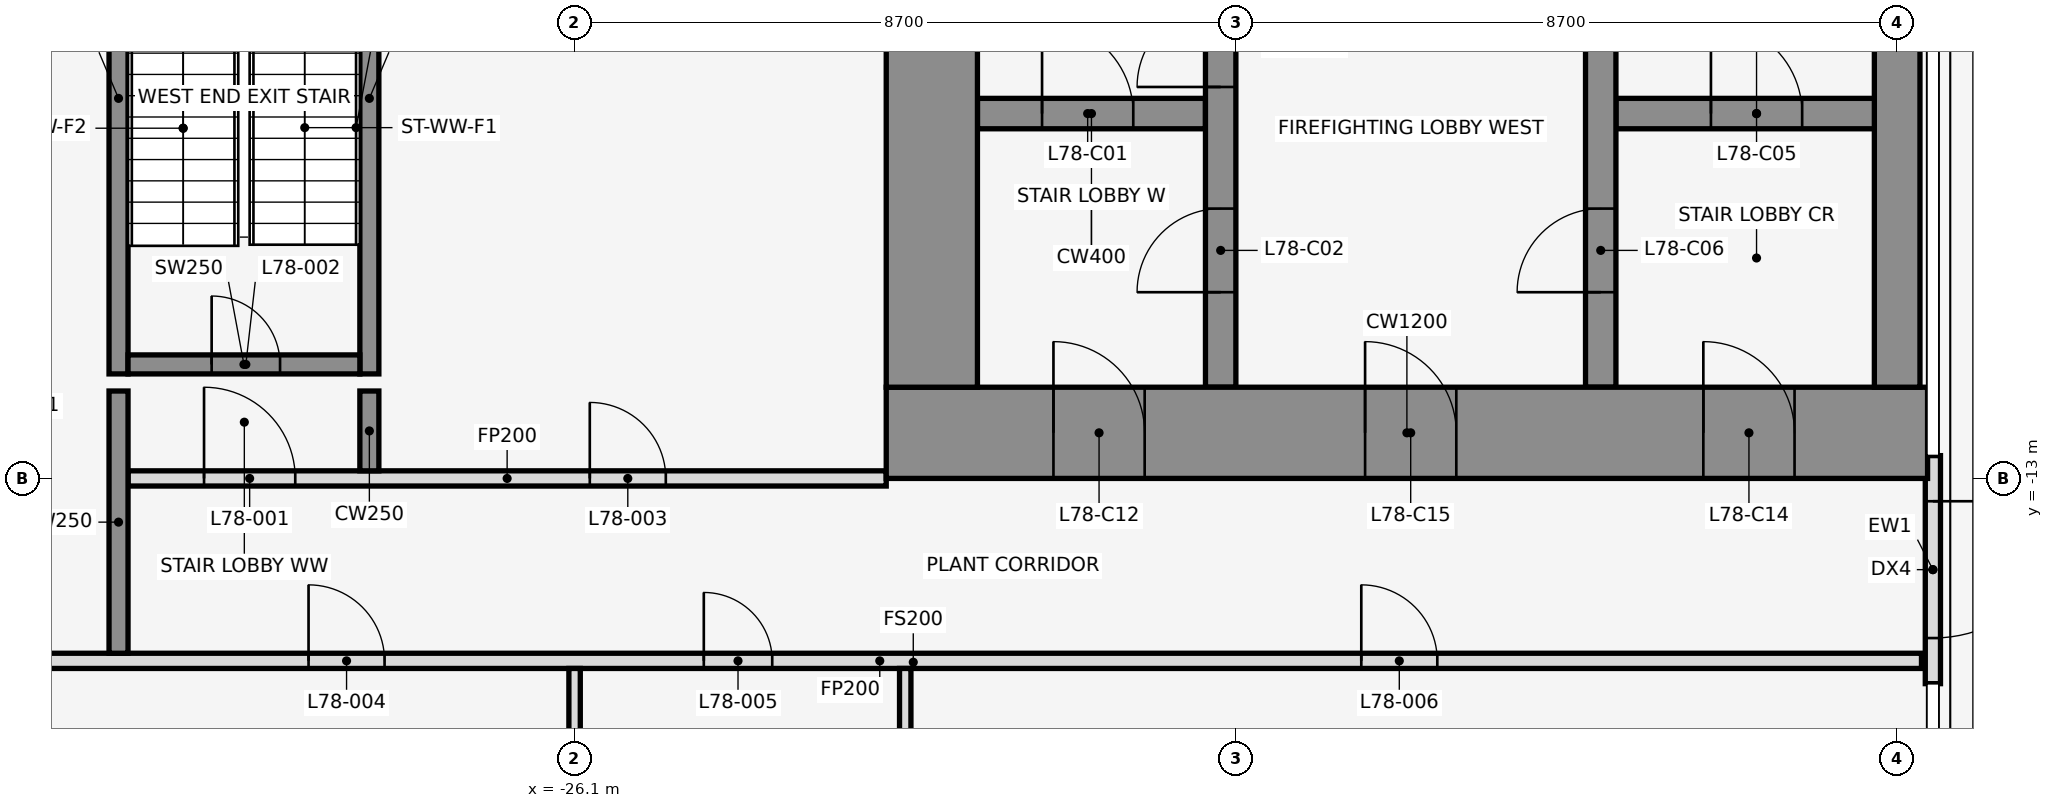
"""IFC4 building model, lengths in metres.
Left out: names, types, materials, properties, quantities, classifications, styles, units other than length and angle.
Written with IfcOpenShell. Run it as: python <this file> out.ifc"""

import sys

from ifc_helpers import new_model, si_unit, direction, frame, frame_2d, origin, place, context, subcontext, project, spatial, rectangle, extrude, element, fill, save


model = new_model("IFC4")
c1 = context("Model", 3, precision=1e-05, world=origin(), true_north=direction((0.0, 1.0)))
c2 = subcontext(c1, "Body", "Model", "MODEL_VIEW")
j1 = project(units=[si_unit("LENGTHUNIT", "METRE"), si_unit("PLANEANGLEUNIT", "RADIAN")], contexts=[c1])
p1 = place(None, origin())
s1 = spatial("IfcSite", under=j1, at=p1, CompositionType="ELEMENT")
p2 = place(p1, origin())
s2 = spatial("IfcBuilding", under=s1, at=p2, CompositionType="ELEMENT")
p3 = place(p2, frame((0.0, 0.0, 347.9)))
s3 = spatial("IfcBuildingStorey", under=s2, at=p3, CompositionType="ELEMENT", Elevation=347.9)
p4 = place(p3, frame((-8.23, -12.7, 0.0), z_axis=(0.0, 0.0, 1.0), x_axis=(0.0, -1.0, 0.0)))
e1 = element("IfcWall", 1, at=p4, inside=s3, PredefinedType="STANDARD", context=c2, shape_type="SweptSolid", body=[
    extrude(rectangle(XDim=3.0, YDim=0.2, at=frame_2d((1.5, 0.0))), origin(), (0.0, 0.0, 1.0), 4.3),
])
p5 = place(p4, frame((0.6, 0.0, 0.0)))
e2 = element("IfcOpeningElement", 2, at=p5, cuts=e1, PredefinedType="OPENING", context=c2, shape_type="SweptSolid", body=[
    extrude(rectangle(XDim=1.8, YDim=2.4, at=frame_2d((0.9, 1.2))), frame((0.0, 0.112, 0.0), z_axis=(0.0, -1.0, 0.0), x_axis=(1.0, 0.0, 0.0)), (0.0, 0.0, 1.0), 0.224),
])
for number, where, z_axis, x_axis in (
    (3, (-32.1, -11.625, 0.0), (0.0, 0.0, 1.0), (0.0, 1.0, 0.0)),
    (4, (-28.8, -11.625, 0.0), (0.0, 0.0, 1.0), (0.0, 1.0, 0.0)),
):
    element("IfcWall", number, at=place(p3, frame(where, z_axis=z_axis, x_axis=x_axis)), inside=s3, PredefinedType="SHEAR", context=c2, shape_type="SweptSolid", body=[
        extrude(rectangle(XDim=7.25, YDim=0.25, at=frame_2d((3.625, 0.0))), origin(), (0.0, 0.0, 1.0), 4.5),
    ])
p6 = place(p3, frame((-31.975, -11.5, 0.0), z_axis=(0.0, 0.0, 1.0), x_axis=(1.0, 0.0, 0.0)))
e5 = element("IfcWall", 5, at=p6, inside=s3, PredefinedType="SHEAR", context=c2, shape_type="SweptSolid", body=[
    extrude(rectangle(XDim=3.05, YDim=0.25, at=frame_2d((1.525, 0.0))), origin(), (0.0, 0.0, 1.0), 4.5),
])
p7 = place(p6, frame((1.1, 0.0, 0.0)))
e6 = element("IfcOpeningElement", 6, at=p7, cuts=e5, PredefinedType="OPENING", context=c2, shape_type="SweptSolid", body=[
    extrude(rectangle(XDim=0.9, YDim=2.1, at=frame_2d((0.45, 1.05))), frame((0.0, 0.137, 0.0), z_axis=(0.0, -1.0, 0.0), x_axis=(1.0, 0.0, 0.0)), (0.0, 0.0, 1.0), 0.274),
])
p8 = place(p3, frame((-35.79, -15.4, 0.0), z_axis=(0.0, 0.0, 1.0), x_axis=(1.0, 0.0, 0.0)))
e7 = element("IfcWall", 7, at=p8, inside=s3, PredefinedType="PARTITIONING", context=c2, shape_type="SweptSolid", body=[
    extrude(rectangle(XDim=27.41, YDim=0.2, at=frame_2d((13.705, 0.0))), origin(), (0.0, 0.0, 1.0), 3.368),
])
p9 = place(p8, frame((6.19, 0.0, 0.0)))
e8 = element("IfcOpeningElement", 8, at=p9, cuts=e7, PredefinedType="OPENING", context=c2, shape_type="SweptSolid", body=[
    extrude(rectangle(XDim=1.0, YDim=2.1, at=frame_2d((0.5, 1.05))), frame((0.0, 0.112, 0.0), z_axis=(0.0, -1.0, 0.0), x_axis=(1.0, 0.0, 0.0)), (0.0, 0.0, 1.0), 0.224),
])
p10 = place(p8, frame((11.39, 0.0, 0.0)))
e9 = element("IfcOpeningElement", 9, at=p10, cuts=e7, PredefinedType="OPENING", context=c2, shape_type="SweptSolid", body=[
    extrude(rectangle(XDim=0.9, YDim=2.1, at=frame_2d((0.45, 1.05))), frame((0.0, 0.112, 0.0), z_axis=(0.0, -1.0, 0.0), x_axis=(1.0, 0.0, 0.0)), (0.0, 0.0, 1.0), 0.224),
])
p11 = place(p8, frame((20.04, 0.0, 0.0)))
e10 = element("IfcOpeningElement", 10, at=p11, cuts=e7, PredefinedType="OPENING", context=c2, shape_type="SweptSolid", body=[
    extrude(rectangle(XDim=1.0, YDim=2.1, at=frame_2d((0.5, 1.05))), frame((0.0, 0.112, 0.0), z_axis=(0.0, -1.0, 0.0), x_axis=(1.0, 0.0, 0.0)), (0.0, 0.0, 1.0), 0.224),
])
p12 = place(p3, frame((-31.975, -13.0, 0.0), z_axis=(0.0, 0.0, 1.0), x_axis=(1.0, 0.0, 0.0)))
e11 = element("IfcWall", 11, at=p12, inside=s3, PredefinedType="PARTITIONING", context=c2, shape_type="SweptSolid", body=[
    extrude(rectangle(XDim=9.975, YDim=0.2, at=frame_2d((4.988, 0.0))), origin(), (0.0, 0.0, 1.0), 3.368),
])
p13 = place(p12, frame((1.0, 0.0, 0.0)))
e12 = element("IfcOpeningElement", 12, at=p13, cuts=e11, PredefinedType="OPENING", context=c2, shape_type="SweptSolid", body=[
    extrude(rectangle(XDim=1.2, YDim=2.1, at=frame_2d((0.6, 1.05))), frame((0.0, 0.112, 0.0), z_axis=(0.0, -1.0, 0.0), x_axis=(1.0, 0.0, 0.0)), (0.0, 0.0, 1.0), 0.224),
])
p14 = place(p12, frame((6.075, 0.0, 0.0)))
e13 = element("IfcOpeningElement", 13, at=p14, cuts=e11, PredefinedType="OPENING", context=c2, shape_type="SweptSolid", body=[
    extrude(rectangle(XDim=1.0, YDim=2.1, at=frame_2d((0.5, 1.05))), frame((0.0, 0.112, 0.0), z_axis=(0.0, -1.0, 0.0), x_axis=(1.0, 0.0, 0.0)), (0.0, 0.0, 1.0), 0.224),
])
p15 = place(p3, frame((-32.1, -15.3, 0.0), z_axis=(0.0, 0.0, 1.0), x_axis=(0.0, 1.0, 0.0)))
e14 = element("IfcWall", 14, at=p15, inside=s3, PredefinedType="SHEAR", context=c2, shape_type="SweptSolid", body=[
    extrude(rectangle(XDim=3.45, YDim=0.25, at=frame_2d((1.725, 0.0))), origin(), (0.0, 0.0, 1.0), 4.5),
])
p16 = place(p3, frame((-28.8, -12.9, 0.0), z_axis=(0.0, 0.0, 1.0), x_axis=(0.0, 1.0, 0.0)))
e15 = element("IfcWall", 15, at=p16, inside=s3, PredefinedType="SHEAR", context=c2, shape_type="SweptSolid", body=[
    extrude(rectangle(XDim=1.05, YDim=0.25, at=frame_2d((0.525, 0.0))), origin(), (0.0, 0.0, 1.0), 4.5),
])
for number, where, z_axis, x_axis in (
    (16, (-26.1, -24.22, 0.0), (0.0, 0.0, 1.0), (0.0, 1.0, 0.0)),
    (17, (-21.75, -24.22, 0.0), (0.0, 0.0, 1.0), (0.0, 1.0, 0.0)),
):
    element("IfcWall", number, at=place(p3, frame(where, z_axis=z_axis, x_axis=x_axis)), inside=s3, PredefinedType="PARTITIONING", context=c2, shape_type="SweptSolid", body=[
        extrude(rectangle(XDim=8.72, YDim=0.15, at=frame_2d((4.36, 0.0))), origin(), (0.0, 0.0, 1.0), 3.368),
    ])
p17 = place(p3, frame((-20.8, -8.2, 0.0), z_axis=(0.0, 0.0, 1.0), x_axis=(1.0, 0.0, 0.0)))
e18 = element("IfcWall", 18, at=p17, inside=s3, PredefinedType="SHEAR", context=c2, shape_type="SweptSolid", body=[
    extrude(rectangle(XDim=3.0, YDim=0.4, at=frame_2d((1.5, 0.0))), origin(), (0.0, 0.0, 1.0), 4.5),
])
p18 = place(p17, frame((0.85, 0.0, 0.0)))
e19 = element("IfcOpeningElement", 19, at=p18, cuts=e18, PredefinedType="OPENING", context=c2, shape_type="SweptSolid", body=[
    extrude(rectangle(XDim=1.2, YDim=2.1, at=frame_2d((0.6, 1.05))), frame((0.0, 0.212, 0.0), z_axis=(0.0, -1.0, 0.0), x_axis=(1.0, 0.0, 0.0)), (0.0, 0.0, 1.0), 0.424),
])
p19 = place(p3, frame((-12.4, -8.2, 0.0), z_axis=(0.0, 0.0, 1.0), x_axis=(1.0, 0.0, 0.0)))
e20 = element("IfcWall", 20, at=p19, inside=s3, PredefinedType="SHEAR", context=c2, shape_type="SweptSolid", body=[
    extrude(rectangle(XDim=3.7, YDim=0.4, at=frame_2d((1.85, 0.0))), origin(), (0.0, 0.0, 1.0), 4.5),
])
p20 = place(p19, frame((1.25, 0.0, 0.0)))
e21 = element("IfcOpeningElement", 21, at=p20, cuts=e20, PredefinedType="OPENING", context=c2, shape_type="SweptSolid", body=[
    extrude(rectangle(XDim=1.2, YDim=2.1, at=frame_2d((0.6, 1.05))), frame((0.0, 0.212, 0.0), z_axis=(0.0, -1.0, 0.0), x_axis=(1.0, 0.0, 0.0)), (0.0, 0.0, 1.0), 0.424),
])
p21 = place(p3, frame((-17.6, -11.8, 0.0), z_axis=(0.0, 0.0, 1.0), x_axis=(0.0, 1.0, 0.0)))
e22 = element("IfcWall", 22, at=p21, inside=s3, PredefinedType="SHEAR", context=c2, shape_type="SweptSolid", body=[
    extrude(rectangle(XDim=10.6, YDim=0.4, at=frame_2d((5.3, 0.0))), origin(), (0.0, 0.0, 1.0), 4.5),
])
p22 = place(p21, frame((1.25, 0.0, 0.0)))
e23 = element("IfcOpeningElement", 23, at=p22, cuts=e22, PredefinedType="OPENING", context=c2, shape_type="SweptSolid", body=[
    extrude(rectangle(XDim=1.1, YDim=2.1, at=frame_2d((0.55, 1.05))), frame((0.0, 0.212, 0.0), z_axis=(0.0, -1.0, 0.0), x_axis=(1.0, 0.0, 0.0)), (0.0, 0.0, 1.0), 0.424),
])
p23 = place(p21, frame((3.95, 0.0, 0.0)))
e24 = element("IfcOpeningElement", 24, at=p23, cuts=e22, PredefinedType="OPENING", context=c2, shape_type="SweptSolid", body=[
    extrude(rectangle(XDim=1.1, YDim=2.1, at=frame_2d((0.55, 1.05))), frame((0.0, 0.212, 0.0), z_axis=(0.0, -1.0, 0.0), x_axis=(1.0, 0.0, 0.0)), (0.0, 0.0, 1.0), 0.424),
])
p24 = place(p3, frame((-12.6, -11.8, 0.0), z_axis=(0.0, 0.0, 1.0), x_axis=(0.0, 1.0, 0.0)))
e25 = element("IfcWall", 25, at=p24, inside=s3, PredefinedType="SHEAR", context=c2, shape_type="SweptSolid", body=[
    extrude(rectangle(XDim=10.6, YDim=0.4, at=frame_2d((5.3, 0.0))), origin(), (0.0, 0.0, 1.0), 4.5),
])
p25 = place(p24, frame((1.25, 0.0, 0.0)))
e26 = element("IfcOpeningElement", 26, at=p25, cuts=e25, PredefinedType="OPENING", context=c2, shape_type="SweptSolid", body=[
    extrude(rectangle(XDim=1.1, YDim=2.1, at=frame_2d((0.55, 1.05))), frame((0.0, 0.212, 0.0), z_axis=(0.0, -1.0, 0.0), x_axis=(1.0, 0.0, 0.0)), (0.0, 0.0, 1.0), 0.424),
])
p26 = place(p3, frame((-22.0, -12.4, 0.0), z_axis=(0.0, 0.0, 1.0), x_axis=(1.0, 0.0, 0.0)))
e27 = element("IfcWall", 27, at=p26, inside=s3, PredefinedType="SHEAR", context=c2, shape_type="SweptSolid", body=[
    extrude(rectangle(XDim=13.7, YDim=1.2, at=frame_2d((6.85, 0.0))), origin(), (0.0, 0.0, 1.0), 4.5),
])
p27 = place(p26, frame((2.2, 0.0, 0.0)))
e28 = element("IfcOpeningElement", 28, at=p27, cuts=e27, PredefinedType="OPENING", context=c2, shape_type="SweptSolid", body=[
    extrude(rectangle(XDim=1.2, YDim=2.1, at=frame_2d((0.6, 1.05))), frame((0.0, 0.612, 0.0), z_axis=(0.0, -1.0, 0.0), x_axis=(1.0, 0.0, 0.0)), (0.0, 0.0, 1.0), 1.224),
])
p28 = place(p26, frame((10.75, 0.0, 0.0)))
e29 = element("IfcOpeningElement", 29, at=p28, cuts=e27, PredefinedType="OPENING", context=c2, shape_type="SweptSolid", body=[
    extrude(rectangle(XDim=1.2, YDim=2.1, at=frame_2d((0.6, 1.05))), frame((0.0, 0.612, 0.0), z_axis=(0.0, -1.0, 0.0), x_axis=(1.0, 0.0, 0.0)), (0.0, 0.0, 1.0), 1.224),
])
p29 = place(p26, frame((6.3, 0.0, 0.0)))
e30 = element("IfcOpeningElement", 30, at=p29, cuts=e27, PredefinedType="OPENING", context=c2, shape_type="SweptSolid", body=[
    extrude(rectangle(XDim=1.2, YDim=2.1, at=frame_2d((0.6, 1.05))), frame((0.0, 0.612, 0.0), z_axis=(0.0, -1.0, 0.0), x_axis=(1.0, 0.0, 0.0)), (0.0, 0.0, 1.0), 1.224),
])
p30 = place(p3, frame((-21.4, -11.8, 0.0), z_axis=(0.0, 0.0, 1.0), x_axis=(0.0, 1.0, 0.0)))
e31 = element("IfcWall", 31, at=p30, inside=s3, PredefinedType="SHEAR", context=c2, shape_type="SweptSolid", body=[
    extrude(rectangle(XDim=10.6, YDim=1.2, at=frame_2d((5.3, 0.0))), origin(), (0.0, 0.0, 1.0), 4.5),
])
p31 = place(p3, frame((-8.7, -11.8, 0.0), z_axis=(0.0, 0.0, 1.0), x_axis=(0.0, 1.0, 0.0)))
e32 = element("IfcWall", 32, at=p31, inside=s3, PredefinedType="SHEAR", context=c2, shape_type="SweptSolid", body=[
    extrude(rectangle(XDim=10.6, YDim=0.6, at=frame_2d((5.3, 0.0))), origin(), (0.0, 0.0, 1.0), 4.5),
])
p32 = place(p5, origin())
e33 = element("IfcDoor", 33, at=p32, inside=s3, OperationType="SINGLE_SWING_LEFT", PredefinedType="DOOR", context=c2, shape_type="SweptSolid", body=[
    extrude(rectangle(XDim=1.8, YDim=2.4, at=frame_2d((0.9, 1.2))), frame((0.0, 0.025, 0.0), z_axis=(0.0, -1.0, 0.0), x_axis=(1.0, 0.0, 0.0)), (0.0, 0.0, 1.0), 0.05),
])
fill(e2, e33)
p33 = place(p13, origin())
e34 = element("IfcDoor", 34, at=p33, inside=s3, OperationType="SINGLE_SWING_LEFT", PredefinedType="DOOR", context=c2, shape_type="SweptSolid", body=[
    extrude(rectangle(XDim=1.2, YDim=2.1, at=frame_2d((0.6, 1.05))), frame((0.0, 0.025, 0.0), z_axis=(0.0, -1.0, 0.0), x_axis=(1.0, 0.0, 0.0)), (0.0, 0.0, 1.0), 0.05),
])
fill(e12, e34)
p34 = place(p7, origin())
e35 = element("IfcDoor", 35, at=p34, inside=s3, OperationType="SINGLE_SWING_LEFT", PredefinedType="DOOR", context=c2, shape_type="SweptSolid", body=[
    extrude(rectangle(XDim=0.9, YDim=2.1, at=frame_2d((0.45, 1.05))), frame((0.0, 0.025, 0.0), z_axis=(0.0, -1.0, 0.0), x_axis=(1.0, 0.0, 0.0)), (0.0, 0.0, 1.0), 0.05),
])
fill(e6, e35)
p35 = place(p14, origin())
e36 = element("IfcDoor", 36, at=p35, inside=s3, OperationType="SINGLE_SWING_RIGHT", PredefinedType="DOOR", context=c2, shape_type="SweptSolid", body=[
    extrude(rectangle(XDim=1.0, YDim=2.1, at=frame_2d((0.5, 1.05))), frame((0.0, 0.025, 0.0), z_axis=(0.0, -1.0, 0.0), x_axis=(1.0, 0.0, 0.0)), (0.0, 0.0, 1.0), 0.05),
])
fill(e13, e36)
p36 = place(p9, frame((1.0, 0.0, 0.0), z_axis=(0.0, 0.0, 1.0), x_axis=(-1.0, 0.0, 0.0)))
e37 = element("IfcDoor", 37, at=p36, inside=s3, OperationType="SINGLE_SWING_LEFT", PredefinedType="DOOR", context=c2, shape_type="SweptSolid", body=[
    extrude(rectangle(XDim=1.0, YDim=2.1, at=frame_2d((0.5, 1.05))), frame((0.0, 0.025, 0.0), z_axis=(0.0, -1.0, 0.0), x_axis=(1.0, 0.0, 0.0)), (0.0, 0.0, 1.0), 0.05),
])
fill(e8, e37)
p37 = place(p10, frame((0.9, 0.0, 0.0), z_axis=(0.0, 0.0, 1.0), x_axis=(-1.0, 0.0, 0.0)))
e38 = element("IfcDoor", 38, at=p37, inside=s3, OperationType="SINGLE_SWING_RIGHT", PredefinedType="DOOR", context=c2, shape_type="SweptSolid", body=[
    extrude(rectangle(XDim=0.9, YDim=2.1, at=frame_2d((0.45, 1.05))), frame((0.0, 0.025, 0.0), z_axis=(0.0, -1.0, 0.0), x_axis=(1.0, 0.0, 0.0)), (0.0, 0.0, 1.0), 0.05),
])
fill(e9, e38)
p38 = place(p11, frame((1.0, 0.0, 0.0), z_axis=(0.0, 0.0, 1.0), x_axis=(-1.0, 0.0, 0.0)))
e39 = element("IfcDoor", 39, at=p38, inside=s3, OperationType="SINGLE_SWING_RIGHT", PredefinedType="DOOR", context=c2, shape_type="SweptSolid", body=[
    extrude(rectangle(XDim=1.0, YDim=2.1, at=frame_2d((0.5, 1.05))), frame((0.0, 0.025, 0.0), z_axis=(0.0, -1.0, 0.0), x_axis=(1.0, 0.0, 0.0)), (0.0, 0.0, 1.0), 0.05),
])
fill(e10, e39)
p39 = place(p18, origin())
e40 = element("IfcDoor", 40, at=p39, inside=s3, OperationType="SINGLE_SWING_LEFT", PredefinedType="DOOR", context=c2, shape_type="SweptSolid", body=[
    extrude(rectangle(XDim=1.2, YDim=2.1, at=frame_2d((0.6, 1.05))), frame((0.0, 0.025, 0.0), z_axis=(0.0, -1.0, 0.0), x_axis=(1.0, 0.0, 0.0)), (0.0, 0.0, 1.0), 0.05),
])
fill(e19, e40)
p40 = place(p22, frame((1.1, 0.0, 0.0), z_axis=(0.0, 0.0, 1.0), x_axis=(-1.0, 0.0, 0.0)))
e41 = element("IfcDoor", 41, at=p40, inside=s3, OperationType="SINGLE_SWING_LEFT", PredefinedType="DOOR", context=c2, shape_type="SweptSolid", body=[
    extrude(rectangle(XDim=1.1, YDim=2.1, at=frame_2d((0.55, 1.05))), frame((0.0, 0.025, 0.0), z_axis=(0.0, -1.0, 0.0), x_axis=(1.0, 0.0, 0.0)), (0.0, 0.0, 1.0), 0.05),
])
fill(e23, e41)
p41 = place(p20, origin())
e42 = element("IfcDoor", 42, at=p41, inside=s3, OperationType="SINGLE_SWING_LEFT", PredefinedType="DOOR", context=c2, shape_type="SweptSolid", body=[
    extrude(rectangle(XDim=1.2, YDim=2.1, at=frame_2d((0.6, 1.05))), frame((0.0, 0.025, 0.0), z_axis=(0.0, -1.0, 0.0), x_axis=(1.0, 0.0, 0.0)), (0.0, 0.0, 1.0), 0.05),
])
fill(e21, e42)
p42 = place(p25, origin())
e43 = element("IfcDoor", 43, at=p42, inside=s3, OperationType="SINGLE_SWING_RIGHT", PredefinedType="DOOR", context=c2, shape_type="SweptSolid", body=[
    extrude(rectangle(XDim=1.1, YDim=2.1, at=frame_2d((0.55, 1.05))), frame((0.0, 0.025, 0.0), z_axis=(0.0, -1.0, 0.0), x_axis=(1.0, 0.0, 0.0)), (0.0, 0.0, 1.0), 0.05),
])
fill(e26, e43)
p43 = place(p23, frame((1.1, 0.0, 0.0), z_axis=(0.0, 0.0, 1.0), x_axis=(-1.0, 0.0, 0.0)))
e44 = element("IfcDoor", 44, at=p43, inside=s3, OperationType="SINGLE_SWING_RIGHT", PredefinedType="DOOR", context=c2, shape_type="SweptSolid", body=[
    extrude(rectangle(XDim=1.1, YDim=2.1, at=frame_2d((0.55, 1.05))), frame((0.0, 0.025, 0.0), z_axis=(0.0, -1.0, 0.0), x_axis=(1.0, 0.0, 0.0)), (0.0, 0.0, 1.0), 0.05),
])
fill(e24, e44)
p44 = place(p27, frame((1.2, 0.0, 0.0), z_axis=(0.0, 0.0, 1.0), x_axis=(-1.0, 0.0, 0.0)))
e45 = element("IfcDoor", 45, at=p44, inside=s3, OperationType="SINGLE_SWING_RIGHT", PredefinedType="DOOR", context=c2, shape_type="SweptSolid", body=[
    extrude(rectangle(XDim=1.2, YDim=2.1, at=frame_2d((0.6, 1.05))), frame((0.0, 0.025, 0.0), z_axis=(0.0, -1.0, 0.0), x_axis=(1.0, 0.0, 0.0)), (0.0, 0.0, 1.0), 0.05),
])
fill(e28, e45)
p45 = place(p28, frame((1.2, 0.0, 0.0), z_axis=(0.0, 0.0, 1.0), x_axis=(-1.0, 0.0, 0.0)))
e46 = element("IfcDoor", 46, at=p45, inside=s3, OperationType="SINGLE_SWING_RIGHT", PredefinedType="DOOR", context=c2, shape_type="SweptSolid", body=[
    extrude(rectangle(XDim=1.2, YDim=2.1, at=frame_2d((0.6, 1.05))), frame((0.0, 0.025, 0.0), z_axis=(0.0, -1.0, 0.0), x_axis=(1.0, 0.0, 0.0)), (0.0, 0.0, 1.0), 0.05),
])
fill(e29, e46)
p46 = place(p29, frame((1.2, 0.0, 0.0), z_axis=(0.0, 0.0, 1.0), x_axis=(-1.0, 0.0, 0.0)))
e47 = element("IfcDoor", 47, at=p46, inside=s3, OperationType="SINGLE_SWING_RIGHT", PredefinedType="DOOR", context=c2, shape_type="SweptSolid", body=[
    extrude(rectangle(XDim=1.2, YDim=2.1, at=frame_2d((0.6, 1.05))), frame((0.0, 0.025, 0.0), z_axis=(0.0, -1.0, 0.0), x_axis=(1.0, 0.0, 0.0)), (0.0, 0.0, 1.0), 0.05),
])
fill(e30, e47)
save(model, sys.argv[1])
